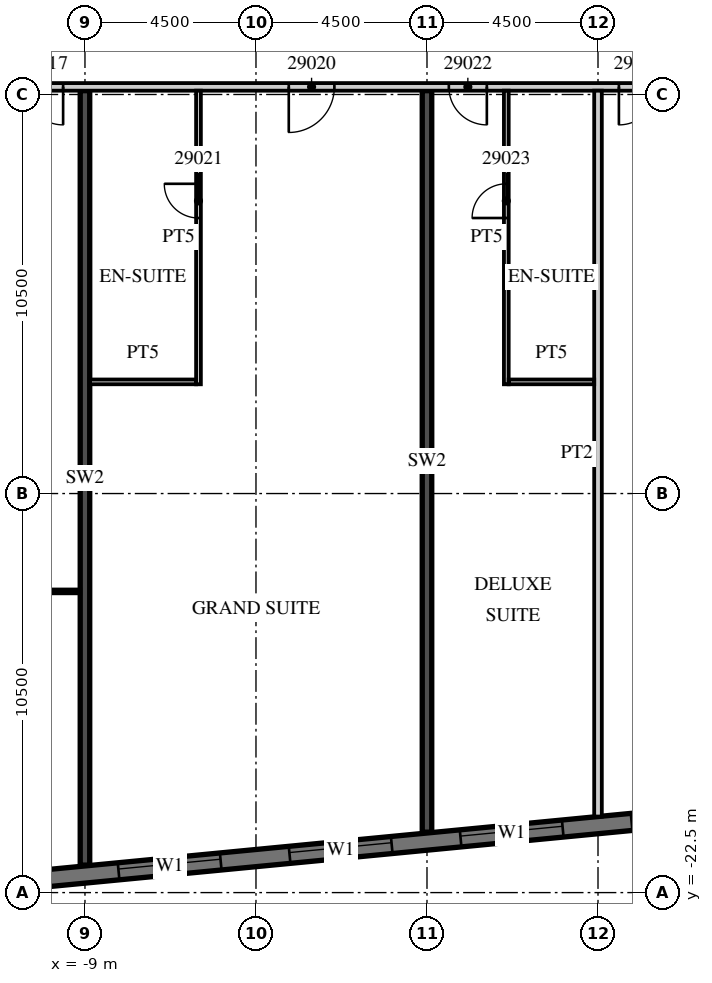
"""IFC4 building model, lengths in metres.
Left out: names, types, materials, properties, quantities, classifications, styles, units other than length and angle.
Written with IfcOpenShell. Run it as: python <this file> out.ifc"""

import sys

from ifc_helpers import new_model, si_unit, direction, frame, frame_2d, origin, place, context, subcontext, project, spatial, rectangle, extrude, element, fill, save


model = new_model("IFC4")
c1 = context("Model", 3, precision=1e-05, world=origin(), true_north=direction((0.0, 1.0)))
c2 = subcontext(c1, "Body", "Model", "MODEL_VIEW")
j1 = project(units=[si_unit("LENGTHUNIT", "METRE"), si_unit("PLANEANGLEUNIT", "RADIAN")], contexts=[c1])
p1 = place(None, origin())
s1 = spatial("IfcSite", under=j1, at=p1, CompositionType="ELEMENT")
p2 = place(p1, origin())
s2 = spatial("IfcBuilding", under=s1, at=p2, CompositionType="ELEMENT")
p3 = place(p2, frame((0.0, 0.0, 130.6)))
s3 = spatial("IfcBuildingStorey", under=s2, at=p3, CompositionType="ELEMENT", Elevation=130.6)
p4 = place(p3, frame((-9.0, -21.777, 0.0), z_axis=(0.0, 0.0, 1.0), x_axis=(0.0, 1.0, 0.0)))
e1 = element("IfcWall", 1, at=p4, inside=s3, PredefinedType="SHEAR", context=c2, shape_type="SweptSolid", body=[
    extrude(rectangle(XDim=20.377, YDim=0.25, at=frame_2d((10.188, 0.0))), origin(), (0.0, 0.0, 1.0), 3.3),
])
p5 = place(p3, frame((0.0, -20.91, 0.0), z_axis=(0.0, 0.0, 1.0), x_axis=(0.0, 1.0, 0.0)))
e2 = element("IfcWall", 2, at=p5, inside=s3, PredefinedType="SHEAR", context=c2, shape_type="SweptSolid", body=[
    extrude(rectangle(XDim=19.51, YDim=0.25, at=frame_2d((9.755, 0.0))), origin(), (0.0, 0.0, 1.0), 3.3),
])
p6 = place(p3, frame((-13.521, -22.46, 0.0), z_axis=(0.0, 0.0, 1.0), x_axis=(0.995396096335, 0.095846812164, 0.0)))
e3 = element("IfcWall", 3, at=p6, inside=s3, PredefinedType="SOLIDWALL", context=c2, shape_type="SweptSolid", body=[
    extrude(rectangle(XDim=59.151, YDim=0.45, at=frame_2d((29.575, 0.0))), origin(), (0.0, 0.0, 1.0), 3.02),
])
p7 = place(p6, frame((0.91, 0.0, 0.45)))
e4 = element("IfcOpeningElement", 4, at=p7, cuts=e3, PredefinedType="OPENING", context=c2, shape_type="SweptSolid", body=[
    extrude(rectangle(XDim=2.7, YDim=2.25, at=frame_2d((1.35, 1.125))), frame((0.0, 0.235, 0.0), z_axis=(0.0, -1.0, 0.0), x_axis=(1.0, 0.0, 0.0)), (0.0, 0.0, 1.0), 0.47),
])
p8 = place(p6, frame((5.431, 0.0, 0.45)))
e5 = element("IfcOpeningElement", 5, at=p8, cuts=e3, PredefinedType="OPENING", context=c2, shape_type="SweptSolid", body=[
    extrude(rectangle(XDim=2.7, YDim=2.25, at=frame_2d((1.35, 1.125))), frame((0.0, 0.235, 0.0), z_axis=(0.0, -1.0, 0.0), x_axis=(1.0, 0.0, 0.0)), (0.0, 0.0, 1.0), 0.47),
])
p9 = place(p6, frame((9.952, 0.0, 0.45)))
e6 = element("IfcOpeningElement", 6, at=p9, cuts=e3, PredefinedType="OPENING", context=c2, shape_type="SweptSolid", body=[
    extrude(rectangle(XDim=2.7, YDim=2.25, at=frame_2d((1.35, 1.125))), frame((0.0, 0.235, 0.0), z_axis=(0.0, -1.0, 0.0), x_axis=(1.0, 0.0, 0.0)), (0.0, 0.0, 1.0), 0.47),
])
p10 = place(p6, frame((14.473, 0.0, 0.45)))
e7 = element("IfcOpeningElement", 7, at=p10, cuts=e3, PredefinedType="OPENING", context=c2, shape_type="SweptSolid", body=[
    extrude(rectangle(XDim=2.7, YDim=2.25, at=frame_2d((1.35, 1.125))), frame((0.0, 0.235, 0.0), z_axis=(0.0, -1.0, 0.0), x_axis=(1.0, 0.0, 0.0)), (0.0, 0.0, 1.0), 0.47),
])
p11 = place(p6, frame((18.994, 0.0, 0.45)))
e8 = element("IfcOpeningElement", 8, at=p11, cuts=e3, PredefinedType="OPENING", context=c2, shape_type="SweptSolid", body=[
    extrude(rectangle(XDim=2.7, YDim=2.25, at=frame_2d((1.35, 1.125))), frame((0.0, 0.235, 0.0), z_axis=(0.0, -1.0, 0.0), x_axis=(1.0, 0.0, 0.0)), (0.0, 0.0, 1.0), 0.47),
])
p12 = place(p6, frame((23.514, 0.0, 0.45)))
e9 = element("IfcOpeningElement", 9, at=p12, cuts=e3, PredefinedType="OPENING", context=c2, shape_type="SweptSolid", body=[
    extrude(rectangle(XDim=2.7, YDim=2.25, at=frame_2d((1.35, 1.125))), frame((0.0, 0.235, 0.0), z_axis=(0.0, -1.0, 0.0), x_axis=(1.0, 0.0, 0.0)), (0.0, 0.0, 1.0), 0.47),
])
p13 = place(p6, frame((28.035, 0.0, 0.45)))
e10 = element("IfcOpeningElement", 10, at=p13, cuts=e3, PredefinedType="OPENING", context=c2, shape_type="SweptSolid", body=[
    extrude(rectangle(XDim=2.7, YDim=2.25, at=frame_2d((1.35, 1.125))), frame((0.0, 0.235, 0.0), z_axis=(0.0, -1.0, 0.0), x_axis=(1.0, 0.0, 0.0)), (0.0, 0.0, 1.0), 0.47),
])
p14 = place(p6, frame((32.556, 0.0, 0.45)))
e11 = element("IfcOpeningElement", 11, at=p14, cuts=e3, PredefinedType="OPENING", context=c2, shape_type="SweptSolid", body=[
    extrude(rectangle(XDim=2.7, YDim=2.25, at=frame_2d((1.35, 1.125))), frame((0.0, 0.235, 0.0), z_axis=(0.0, -1.0, 0.0), x_axis=(1.0, 0.0, 0.0)), (0.0, 0.0, 1.0), 0.47),
])
p15 = place(p6, frame((37.077, 0.0, 0.45)))
e12 = element("IfcOpeningElement", 12, at=p15, cuts=e3, PredefinedType="OPENING", context=c2, shape_type="SweptSolid", body=[
    extrude(rectangle(XDim=2.7, YDim=2.25, at=frame_2d((1.35, 1.125))), frame((0.0, 0.235, 0.0), z_axis=(0.0, -1.0, 0.0), x_axis=(1.0, 0.0, 0.0)), (0.0, 0.0, 1.0), 0.47),
])
p16 = place(p6, frame((41.598, 0.0, 0.45)))
e13 = element("IfcOpeningElement", 13, at=p16, cuts=e3, PredefinedType="OPENING", context=c2, shape_type="SweptSolid", body=[
    extrude(rectangle(XDim=2.7, YDim=2.25, at=frame_2d((1.35, 1.125))), frame((0.0, 0.235, 0.0), z_axis=(0.0, -1.0, 0.0), x_axis=(1.0, 0.0, 0.0)), (0.0, 0.0, 1.0), 0.47),
])
p17 = place(p6, frame((46.118, 0.0, 0.45)))
e14 = element("IfcOpeningElement", 14, at=p17, cuts=e3, PredefinedType="OPENING", context=c2, shape_type="SweptSolid", body=[
    extrude(rectangle(XDim=2.7, YDim=2.25, at=frame_2d((1.35, 1.125))), frame((0.0, 0.235, 0.0), z_axis=(0.0, -1.0, 0.0), x_axis=(1.0, 0.0, 0.0)), (0.0, 0.0, 1.0), 0.47),
])
p18 = place(p6, frame((50.639, 0.0, 0.45)))
e15 = element("IfcOpeningElement", 15, at=p18, cuts=e3, PredefinedType="OPENING", context=c2, shape_type="SweptSolid", body=[
    extrude(rectangle(XDim=2.7, YDim=2.25, at=frame_2d((1.35, 1.125))), frame((0.0, 0.235, 0.0), z_axis=(0.0, -1.0, 0.0), x_axis=(1.0, 0.0, 0.0)), (0.0, 0.0, 1.0), 0.47),
])
p19 = place(p6, frame((55.15, 0.0, 0.45)))
e16 = element("IfcOpeningElement", 16, at=p19, cuts=e3, PredefinedType="OPENING", context=c2, shape_type="SweptSolid", body=[
    extrude(rectangle(XDim=2.7, YDim=2.25, at=frame_2d((1.35, 1.125))), frame((0.0, 0.235, 0.0), z_axis=(0.0, -1.0, 0.0), x_axis=(1.0, 0.0, 0.0)), (0.0, 0.0, 1.0), 0.47),
])
p20 = place(p3, frame((-13.5, -1.3, 0.0), z_axis=(0.0, 0.0, 1.0), x_axis=(1.0, 0.0, 0.0)))
e17 = element("IfcWall", 17, at=p20, inside=s3, PredefinedType="PARTITIONING", context=c2, shape_type="SweptSolid", body=[
    extrude(rectangle(XDim=60.932, YDim=0.2, at=frame_2d((30.466, 0.0))), origin(), (0.0, 0.0, 1.0), 3.02),
])
p21 = place(p20, frame((2.925, 0.0, 0.0)))
e18 = element("IfcOpeningElement", 18, at=p21, cuts=e17, PredefinedType="OPENING", context=c2, shape_type="SweptSolid", body=[
    extrude(rectangle(XDim=1.0, YDim=2.1, at=frame_2d((0.5, 1.05))), frame((0.0, 0.11, 0.0), z_axis=(0.0, -1.0, 0.0), x_axis=(1.0, 0.0, 0.0)), (0.0, 0.0, 1.0), 0.22),
])
p22 = place(p20, frame((9.863, 0.0, 0.0)))
e19 = element("IfcOpeningElement", 19, at=p22, cuts=e17, PredefinedType="OPENING", context=c2, shape_type="SweptSolid", body=[
    extrude(rectangle(XDim=1.2, YDim=2.1, at=frame_2d((0.6, 1.05))), frame((0.0, 0.11, 0.0), z_axis=(0.0, -1.0, 0.0), x_axis=(1.0, 0.0, 0.0)), (0.0, 0.0, 1.0), 0.22),
])
p23 = place(p20, frame((14.075, 0.0, 0.0)))
e20 = element("IfcOpeningElement", 20, at=p23, cuts=e17, PredefinedType="OPENING", context=c2, shape_type="SweptSolid", body=[
    extrude(rectangle(XDim=1.0, YDim=2.1, at=frame_2d((0.5, 1.05))), frame((0.0, 0.11, 0.0), z_axis=(0.0, -1.0, 0.0), x_axis=(1.0, 0.0, 0.0)), (0.0, 0.0, 1.0), 0.22),
])
p24 = place(p20, frame((18.55, 0.0, 0.0)))
e21 = element("IfcOpeningElement", 21, at=p24, cuts=e17, PredefinedType="OPENING", context=c2, shape_type="SweptSolid", body=[
    extrude(rectangle(XDim=1.0, YDim=2.1, at=frame_2d((0.5, 1.05))), frame((0.0, 0.11, 0.0), z_axis=(0.0, -1.0, 0.0), x_axis=(1.0, 0.0, 0.0)), (0.0, 0.0, 1.0), 0.22),
])
p25 = place(p20, frame((24.938, 0.0, 0.0)))
e22 = element("IfcOpeningElement", 22, at=p25, cuts=e17, PredefinedType="OPENING", context=c2, shape_type="SweptSolid", body=[
    extrude(rectangle(XDim=1.2, YDim=2.1, at=frame_2d((0.6, 1.05))), frame((0.0, 0.11, 0.0), z_axis=(0.0, -1.0, 0.0), x_axis=(1.0, 0.0, 0.0)), (0.0, 0.0, 1.0), 0.22),
])
p26 = place(p20, frame((36.862, 0.0, 0.0)))
e23 = element("IfcOpeningElement", 23, at=p26, cuts=e17, PredefinedType="OPENING", context=c2, shape_type="SweptSolid", body=[
    extrude(rectangle(XDim=1.2, YDim=2.1, at=frame_2d((0.6, 1.05))), frame((0.0, 0.11, 0.0), z_axis=(0.0, -1.0, 0.0), x_axis=(1.0, 0.0, 0.0)), (0.0, 0.0, 1.0), 0.22),
])
p27 = place(p20, frame((41.075, 0.0, 0.0)))
e24 = element("IfcOpeningElement", 24, at=p27, cuts=e17, PredefinedType="OPENING", context=c2, shape_type="SweptSolid", body=[
    extrude(rectangle(XDim=1.0, YDim=2.1, at=frame_2d((0.5, 1.05))), frame((0.0, 0.11, 0.0), z_axis=(0.0, -1.0, 0.0), x_axis=(1.0, 0.0, 0.0)), (0.0, 0.0, 1.0), 0.22),
])
p28 = place(p20, frame((45.55, 0.0, 0.0)))
e25 = element("IfcOpeningElement", 25, at=p28, cuts=e17, PredefinedType="OPENING", context=c2, shape_type="SweptSolid", body=[
    extrude(rectangle(XDim=1.0, YDim=2.1, at=frame_2d((0.5, 1.05))), frame((0.0, 0.11, 0.0), z_axis=(0.0, -1.0, 0.0), x_axis=(1.0, 0.0, 0.0)), (0.0, 0.0, 1.0), 0.22),
])
p29 = place(p20, frame((52.425, 0.0, 0.0)))
e26 = element("IfcOpeningElement", 26, at=p29, cuts=e17, PredefinedType="OPENING", context=c2, shape_type="SweptSolid", body=[
    extrude(rectangle(XDim=1.0, YDim=2.1, at=frame_2d((0.5, 1.05))), frame((0.0, 0.11, 0.0), z_axis=(0.0, -1.0, 0.0), x_axis=(1.0, 0.0, 0.0)), (0.0, 0.0, 1.0), 0.22),
])
p30 = place(p20, frame((56.95, 0.0, 0.0)))
e27 = element("IfcOpeningElement", 27, at=p30, cuts=e17, PredefinedType="OPENING", context=c2, shape_type="SweptSolid", body=[
    extrude(rectangle(XDim=1.0, YDim=2.1, at=frame_2d((0.5, 1.05))), frame((0.0, 0.11, 0.0), z_axis=(0.0, -1.0, 0.0), x_axis=(1.0, 0.0, 0.0)), (0.0, 0.0, 1.0), 0.22),
])
p31 = place(p20, frame((59.882, 0.0, 0.0)))
e28 = element("IfcOpeningElement", 28, at=p31, cuts=e17, PredefinedType="OPENING", context=c2, shape_type="SweptSolid", body=[
    extrude(rectangle(XDim=0.9, YDim=2.1, at=frame_2d((0.45, 1.05))), frame((0.0, 0.11, 0.0), z_axis=(0.0, -1.0, 0.0), x_axis=(1.0, 0.0, 0.0)), (0.0, 0.0, 1.0), 0.22),
])
p32 = place(p3, frame((-13.4, -14.575, 0.0), z_axis=(0.0, 0.0, 1.0), x_axis=(1.0, 0.0, 0.0)))
e29 = element("IfcWall", 29, at=p32, inside=s3, PredefinedType="PARTITIONING", context=c2, shape_type="SweptSolid", body=[
    extrude(rectangle(XDim=4.275, YDim=0.1, at=frame_2d((2.137, 0.0))), origin(), (0.0, 0.0, 1.0), 3.02),
])
p33 = place(p32, frame((0.788, 0.0, 0.0)))
e30 = element("IfcOpeningElement", 30, at=p33, cuts=e29, PredefinedType="OPENING", context=c2, shape_type="SweptSolid", body=[
    extrude(rectangle(XDim=1.5, YDim=2.1, at=frame_2d((0.75, 1.05))), frame((0.0, 0.06, 0.0), z_axis=(0.0, -1.0, 0.0), x_axis=(1.0, 0.0, 0.0)), (0.0, 0.0, 1.0), 0.12),
])
p34 = place(p3, frame((-6.013, -9.125, 0.0), z_axis=(0.0, 0.0, 1.0), x_axis=(0.0, 1.0, 0.0)))
e31 = element("IfcWall", 31, at=p34, inside=s3, PredefinedType="PARTITIONING", context=c2, shape_type="SweptSolid", body=[
    extrude(rectangle(XDim=7.725, YDim=0.125, at=frame_2d((3.863, 0.0))), origin(), (0.0, 0.0, 1.0), 3.02),
])
p35 = place(p34, frame((4.375, 0.0, 0.0)))
e32 = element("IfcOpeningElement", 32, at=p35, cuts=e31, PredefinedType="OPENING", context=c2, shape_type="SweptSolid", body=[
    extrude(rectangle(XDim=0.9, YDim=2.1, at=frame_2d((0.45, 1.05))), frame((0.0, 0.073, 0.0), z_axis=(0.0, -1.0, 0.0), x_axis=(1.0, 0.0, 0.0)), (0.0, 0.0, 1.0), 0.145),
])
p36 = place(p3, frame((-8.875, -9.062, 0.0), z_axis=(0.0, 0.0, 1.0), x_axis=(1.0, 0.0, 0.0)))
e33 = element("IfcWall", 33, at=p36, inside=s3, PredefinedType="PARTITIONING", context=c2, shape_type="SweptSolid", body=[
    extrude(rectangle(XDim=2.8, YDim=0.125, at=frame_2d((1.4, 0.0))), origin(), (0.0, 0.0, 1.0), 3.02),
])
p37 = place(p3, frame((4.5, -20.499, 0.0), z_axis=(0.0, 0.0, 1.0), x_axis=(0.0, 1.0, 0.0)))
e34 = element("IfcWall", 34, at=p37, inside=s3, PredefinedType="PARTITIONING", context=c2, shape_type="SweptSolid", body=[
    extrude(rectangle(XDim=19.099, YDim=0.2, at=frame_2d((9.55, 0.0))), origin(), (0.0, 0.0, 1.0), 3.02),
])
p38 = place(p3, frame((2.087, -9.125, 0.0), z_axis=(0.0, 0.0, 1.0), x_axis=(0.0, 1.0, 0.0)))
e35 = element("IfcWall", 35, at=p38, inside=s3, PredefinedType="PARTITIONING", context=c2, shape_type="SweptSolid", body=[
    extrude(rectangle(XDim=7.725, YDim=0.125, at=frame_2d((3.863, 0.0))), origin(), (0.0, 0.0, 1.0), 3.02),
])
p39 = place(p38, frame((4.375, 0.0, 0.0)))
e36 = element("IfcOpeningElement", 36, at=p39, cuts=e35, PredefinedType="OPENING", context=c2, shape_type="SweptSolid", body=[
    extrude(rectangle(XDim=0.9, YDim=2.1, at=frame_2d((0.45, 1.05))), frame((0.0, 0.073, 0.0), z_axis=(0.0, -1.0, 0.0), x_axis=(1.0, 0.0, 0.0)), (0.0, 0.0, 1.0), 0.145),
])
p40 = place(p3, frame((2.15, -9.062, 0.0), z_axis=(0.0, 0.0, 1.0), x_axis=(1.0, 0.0, 0.0)))
e37 = element("IfcWall", 37, at=p40, inside=s3, PredefinedType="PARTITIONING", context=c2, shape_type="SweptSolid", body=[
    extrude(rectangle(XDim=2.25, YDim=0.125, at=frame_2d((1.125, 0.0))), origin(), (0.0, 0.0, 1.0), 3.02),
])
p41 = place(p8, origin())
e38 = element("IfcWindow", 38, at=p41, inside=s3, PartitioningType="SINGLE_PANEL", PredefinedType="WINDOW", context=c2, shape_type="SweptSolid", body=[
    extrude(rectangle(XDim=2.7, YDim=2.25, at=frame_2d((1.35, 1.125))), frame((0.0, 0.09, 0.0), z_axis=(0.0, -1.0, 0.0), x_axis=(1.0, 0.0, 0.0)), (0.0, 0.0, 1.0), 0.06),
])
fill(e5, e38)
p42 = place(p9, origin())
e39 = element("IfcWindow", 39, at=p42, inside=s3, PartitioningType="SINGLE_PANEL", PredefinedType="WINDOW", context=c2, shape_type="SweptSolid", body=[
    extrude(rectangle(XDim=2.7, YDim=2.25, at=frame_2d((1.35, 1.125))), frame((0.0, 0.09, 0.0), z_axis=(0.0, -1.0, 0.0), x_axis=(1.0, 0.0, 0.0)), (0.0, 0.0, 1.0), 0.06),
])
fill(e6, e39)
p43 = place(p10, origin())
e40 = element("IfcWindow", 40, at=p43, inside=s3, PartitioningType="SINGLE_PANEL", PredefinedType="WINDOW", context=c2, shape_type="SweptSolid", body=[
    extrude(rectangle(XDim=2.7, YDim=2.25, at=frame_2d((1.35, 1.125))), frame((0.0, 0.09, 0.0), z_axis=(0.0, -1.0, 0.0), x_axis=(1.0, 0.0, 0.0)), (0.0, 0.0, 1.0), 0.06),
])
fill(e7, e40)
p44 = place(p11, origin())
e41 = element("IfcWindow", 41, at=p44, inside=s3, PartitioningType="SINGLE_PANEL", PredefinedType="WINDOW", context=c2, shape_type="SweptSolid", body=[
    extrude(rectangle(XDim=2.7, YDim=2.25, at=frame_2d((1.35, 1.125))), frame((0.0, 0.09, 0.0), z_axis=(0.0, -1.0, 0.0), x_axis=(1.0, 0.0, 0.0)), (0.0, 0.0, 1.0), 0.06),
])
fill(e8, e41)
p45 = place(p21, origin())
e42 = element("IfcDoor", 42, at=p45, inside=s3, OperationType="SINGLE_SWING_RIGHT", PredefinedType="DOOR", context=c2, shape_type="SweptSolid", body=[
    extrude(rectangle(XDim=1.0, YDim=2.1, at=frame_2d((0.5, 1.05))), frame((0.0, 0.025, 0.0), z_axis=(0.0, -1.0, 0.0), x_axis=(1.0, 0.0, 0.0)), (0.0, 0.0, 1.0), 0.05),
])
fill(e18, e42)
p46 = place(p22, origin())
e43 = element("IfcDoor", 43, at=p46, inside=s3, OperationType="SINGLE_SWING_LEFT", PredefinedType="DOOR", context=c2, shape_type="SweptSolid", body=[
    extrude(rectangle(XDim=1.2, YDim=2.1, at=frame_2d((0.6, 1.05))), frame((0.0, 0.025, 0.0), z_axis=(0.0, -1.0, 0.0), x_axis=(1.0, 0.0, 0.0)), (0.0, 0.0, 1.0), 0.05),
])
fill(e19, e43)
p47 = place(p35, origin())
e44 = element("IfcDoor", 44, at=p47, inside=s3, OperationType="SINGLE_SWING_RIGHT", PredefinedType="DOOR", context=c2, shape_type="SweptSolid", body=[
    extrude(rectangle(XDim=0.9, YDim=2.1, at=frame_2d((0.45, 1.05))), frame((0.0, 0.025, 0.0), z_axis=(0.0, -1.0, 0.0), x_axis=(1.0, 0.0, 0.0)), (0.0, 0.0, 1.0), 0.05),
])
fill(e32, e44)
p48 = place(p23, origin())
e45 = element("IfcDoor", 45, at=p48, inside=s3, OperationType="SINGLE_SWING_RIGHT", PredefinedType="DOOR", context=c2, shape_type="SweptSolid", body=[
    extrude(rectangle(XDim=1.0, YDim=2.1, at=frame_2d((0.5, 1.05))), frame((0.0, 0.025, 0.0), z_axis=(0.0, -1.0, 0.0), x_axis=(1.0, 0.0, 0.0)), (0.0, 0.0, 1.0), 0.05),
])
fill(e20, e45)
p49 = place(p39, origin())
e46 = element("IfcDoor", 46, at=p49, inside=s3, OperationType="SINGLE_SWING_LEFT", PredefinedType="DOOR", context=c2, shape_type="SweptSolid", body=[
    extrude(rectangle(XDim=0.9, YDim=2.1, at=frame_2d((0.45, 1.05))), frame((0.0, 0.025, 0.0), z_axis=(0.0, -1.0, 0.0), x_axis=(1.0, 0.0, 0.0)), (0.0, 0.0, 1.0), 0.05),
])
fill(e36, e46)
p50 = place(p24, origin())
e47 = element("IfcDoor", 47, at=p50, inside=s3, OperationType="SINGLE_SWING_LEFT", PredefinedType="DOOR", context=c2, shape_type="SweptSolid", body=[
    extrude(rectangle(XDim=1.0, YDim=2.1, at=frame_2d((0.5, 1.05))), frame((0.0, 0.025, 0.0), z_axis=(0.0, -1.0, 0.0), x_axis=(1.0, 0.0, 0.0)), (0.0, 0.0, 1.0), 0.05),
])
fill(e21, e47)
save(model, sys.argv[1])
